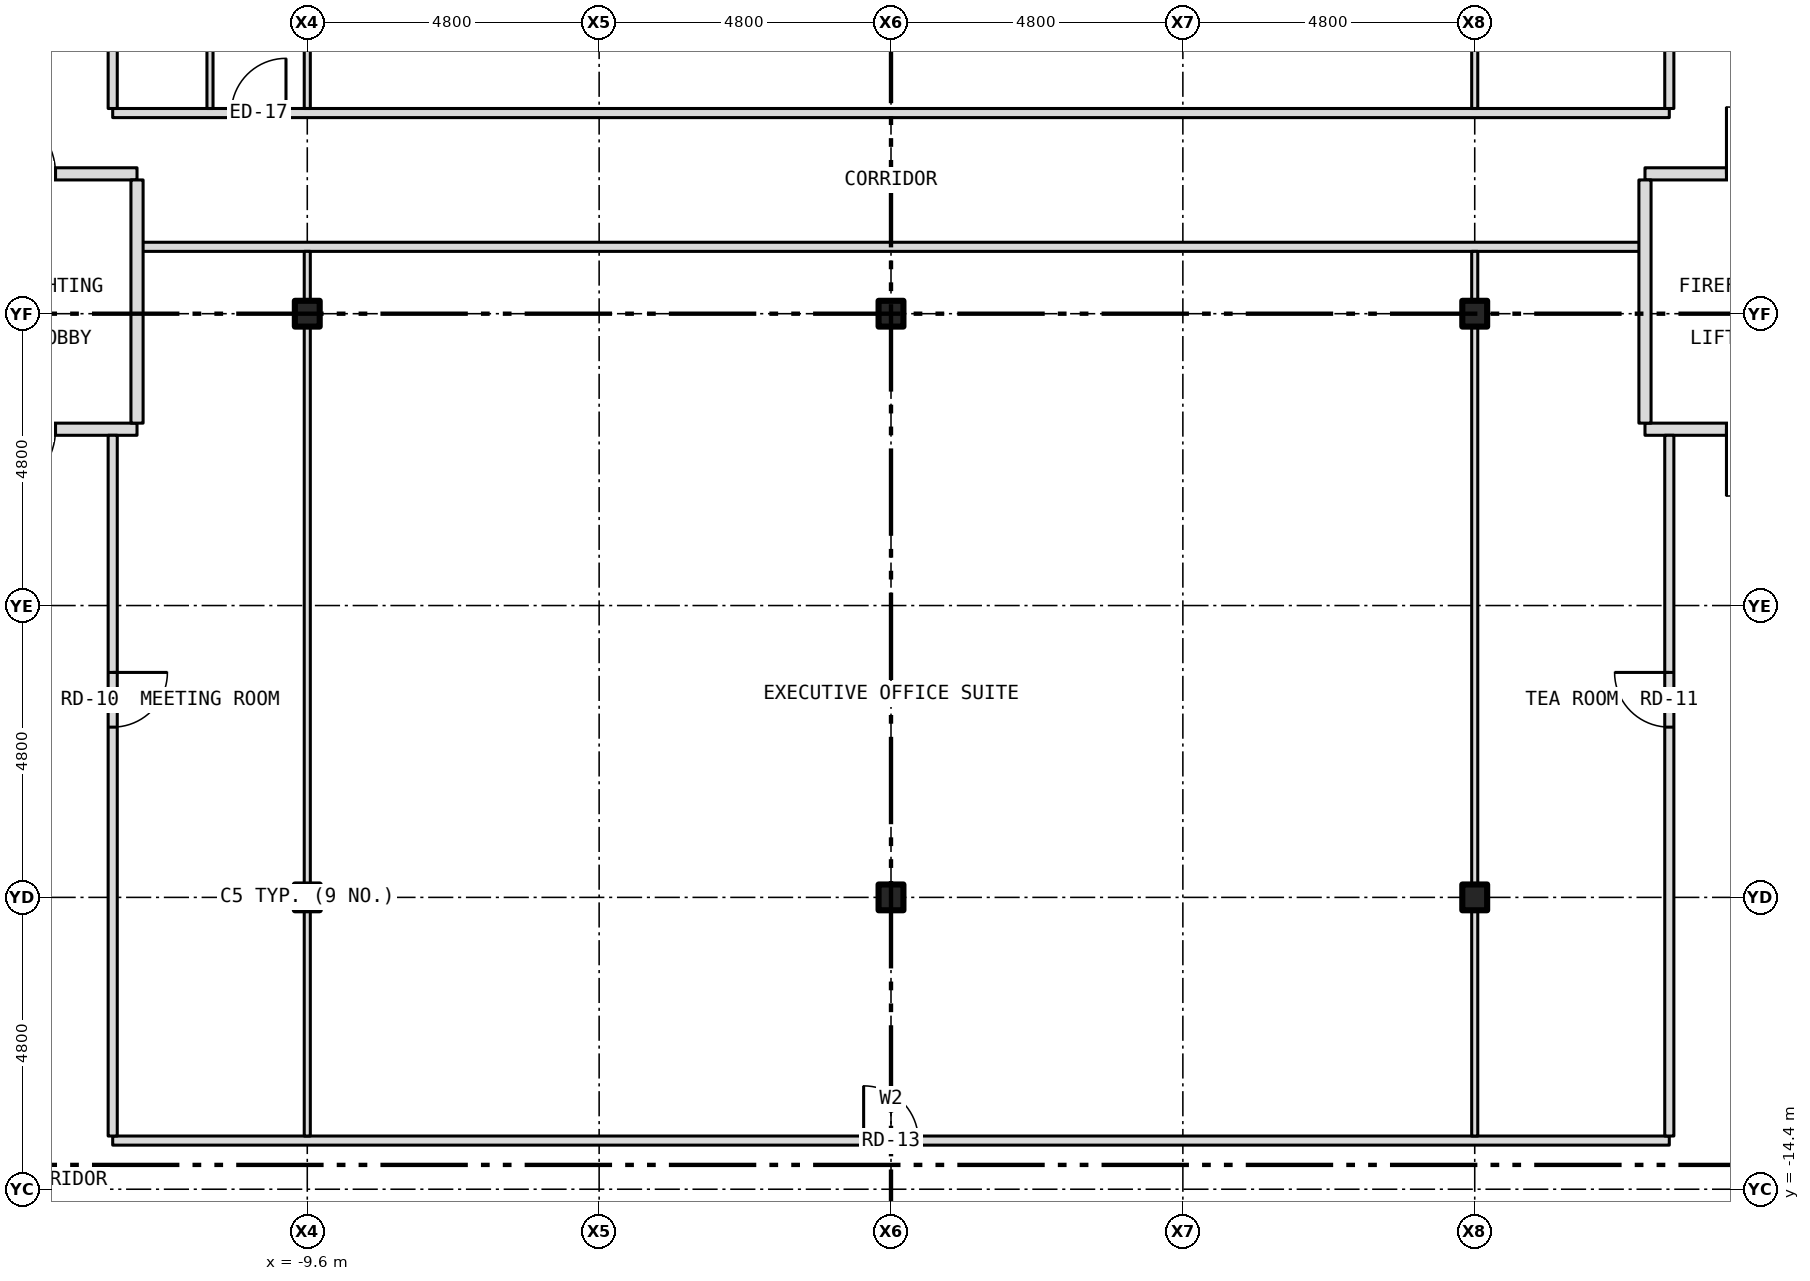
"""IFC4 building model, lengths in metres.
Left out: names, types, materials, properties, quantities, classifications, styles, units other than length and angle.
Written with IfcOpenShell. Run it as: python <this file> out.ifc"""

import sys

from ifc_helpers import new_model, si_unit, direction, frame, frame_2d, origin, origin_2d, place, context, subcontext, project, spatial, rectangle, i_section, extrude, element, fill, save


model = new_model("IFC4")
c1 = context("Model", 3, precision=1e-05, world=origin(), true_north=direction((0.0, 1.0)))
c2 = subcontext(c1, "Body", "Model", "MODEL_VIEW")
j1 = project(units=[si_unit("LENGTHUNIT", "METRE"), si_unit("PLANEANGLEUNIT", "RADIAN")], contexts=[c1])
p1 = place(None, origin())
s1 = spatial("IfcSite", under=j1, at=p1, CompositionType="ELEMENT")
p2 = place(p1, origin())
s2 = spatial("IfcBuilding", under=s1, at=p2, CompositionType="ELEMENT")
p3 = place(p2, frame((0.0, 0.0, 39.0)))
s3 = spatial("IfcBuildingStorey", under=s2, at=p3, CompositionType="ELEMENT", Elevation=39.0)
for number, where, z_axis, x_axis in (
    (1, (-9.6, -9.6, -0.15), (0.0, 0.0, 1.0), (1.0, 0.0, 0.0)),
    (2, (-9.6, 0.0, -0.15), (0.0, 0.0, 1.0), (1.0, 0.0, 0.0)),
    (3, (0.0, -9.6, -0.15), (0.0, 0.0, 1.0), (1.0, 0.0, 0.0)),
    (4, (0.0, 0.0, -0.15), (0.0, 0.0, 1.0), (1.0, 0.0, 0.0)),
    (5, (9.6, -9.6, -0.15), (0.0, 0.0, 1.0), (1.0, 0.0, 0.0)),
    (6, (9.6, 0.0, -0.15), (0.0, 0.0, 1.0), (1.0, 0.0, 0.0)),
):
    element("IfcColumn", number, at=place(p3, frame(where, z_axis=z_axis, x_axis=x_axis)), inside=s3, PredefinedType="COLUMN", context=c2, shape_type="SweptSolid", body=[
        extrude(i_section(OverallWidth=0.409, OverallDepth=0.424, WebThickness=0.033, FlangeThickness=0.052, at=origin_2d()), origin(), (0.0, 0.0, 1.0), 3.5),
    ])
p4 = place(p3, frame((-12.8, -13.6, 0.0), z_axis=(0.0, 0.0, 1.0), x_axis=(1.0, 0.0, 0.0)))
e7 = element("IfcWall", 7, at=p4, inside=s3, PredefinedType="PARTITIONING", context=c2, shape_type="SweptSolid", body=[
    extrude(rectangle(XDim=25.6, YDim=0.15, at=frame_2d((12.8, 0.0))), origin(), (0.0, 0.0, 1.0), 3.35),
])
p5 = place(p4, frame((12.35, 0.0, 0.0)))
e8 = element("IfcOpeningElement", 8, at=p5, cuts=e7, PredefinedType="OPENING", context=c2, shape_type="SweptSolid", body=[
    extrude(rectangle(XDim=0.9, YDim=2.1, at=frame_2d((0.45, 1.05))), frame((0.0, 0.087, 0.0), z_axis=(0.0, -1.0, 0.0), x_axis=(1.0, 0.0, 0.0)), (0.0, 0.0, 1.0), 0.174),
])
p6 = place(p3, frame((-15.68, -1.9, 0.0), z_axis=(0.0, 0.0, 1.0), x_axis=(1.0, 0.0, 0.0)))
e9 = element("IfcWall", 9, at=p6, inside=s3, PredefinedType="PARTITIONING", context=c2, shape_type="SweptSolid", body=[
    extrude(rectangle(XDim=3.28, YDim=0.2, at=frame_2d((1.64, 0.0))), origin(), (0.0, 0.0, 1.0), 3.35),
])
p7 = place(p6, frame((0.84, 0.0, 0.0)))
e10 = element("IfcOpeningElement", 10, at=p7, cuts=e9, PredefinedType="OPENING", context=c2, shape_type="SweptSolid", body=[
    extrude(rectangle(XDim=1.1, YDim=2.1, at=frame_2d((0.55, 1.05))), frame((0.0, 0.112, 0.0), z_axis=(0.0, -1.0, 0.0), x_axis=(1.0, 0.0, 0.0)), (0.0, 0.0, 1.0), 0.224),
])
p8 = place(p3, frame((12.4, -1.9, 0.0), z_axis=(0.0, 0.0, 1.0), x_axis=(1.0, 0.0, 0.0)))
e11 = element("IfcWall", 11, at=p8, inside=s3, PredefinedType="PARTITIONING", context=c2, shape_type="SweptSolid", body=[
    extrude(rectangle(XDim=3.28, YDim=0.2, at=frame_2d((1.64, 0.0))), origin(), (0.0, 0.0, 1.0), 3.35),
])
p9 = place(p8, frame((1.34, 0.0, 0.0)))
e12 = element("IfcOpeningElement", 12, at=p9, cuts=e11, PredefinedType="OPENING", context=c2, shape_type="SweptSolid", body=[
    extrude(rectangle(XDim=1.1, YDim=2.1, at=frame_2d((0.55, 1.05))), frame((0.0, 0.112, 0.0), z_axis=(0.0, -1.0, 0.0), x_axis=(1.0, 0.0, 0.0)), (0.0, 0.0, 1.0), 0.224),
])
p10 = place(p3, frame((-12.4, 1.1, 0.0), z_axis=(0.0, 0.0, 1.0), x_axis=(1.0, 0.0, 0.0)))
e13 = element("IfcWall", 13, at=p10, inside=s3, PredefinedType="PARTITIONING", context=c2, shape_type="SweptSolid", body=[
    extrude(rectangle(XDim=24.8, YDim=0.15, at=frame_2d((12.4, 0.0))), origin(), (0.0, 0.0, 1.0), 3.35),
])
p11 = place(p3, frame((-15.68, 2.3, 0.0), z_axis=(0.0, 0.0, 1.0), x_axis=(1.0, 0.0, 0.0)))
e14 = element("IfcWall", 14, at=p11, inside=s3, PredefinedType="PARTITIONING", context=c2, shape_type="SweptSolid", body=[
    extrude(rectangle(XDim=3.28, YDim=0.2, at=frame_2d((1.64, 0.0))), origin(), (0.0, 0.0, 1.0), 3.35),
])
p12 = place(p11, frame((0.84, 0.0, 0.0)))
e15 = element("IfcOpeningElement", 15, at=p12, cuts=e14, PredefinedType="OPENING", context=c2, shape_type="SweptSolid", body=[
    extrude(rectangle(XDim=1.1, YDim=2.1, at=frame_2d((0.55, 1.05))), frame((0.0, 0.112, 0.0), z_axis=(0.0, -1.0, 0.0), x_axis=(1.0, 0.0, 0.0)), (0.0, 0.0, 1.0), 0.224),
])
p13 = place(p3, frame((12.4, 2.3, 0.0), z_axis=(0.0, 0.0, 1.0), x_axis=(1.0, 0.0, 0.0)))
e16 = element("IfcWall", 16, at=p13, inside=s3, PredefinedType="PARTITIONING", context=c2, shape_type="SweptSolid", body=[
    extrude(rectangle(XDim=3.28, YDim=0.2, at=frame_2d((1.64, 0.0))), origin(), (0.0, 0.0, 1.0), 3.35),
])
p14 = place(p13, frame((1.34, 0.0, 0.0)))
e17 = element("IfcOpeningElement", 17, at=p14, cuts=e16, PredefinedType="OPENING", context=c2, shape_type="SweptSolid", body=[
    extrude(rectangle(XDim=1.1, YDim=2.1, at=frame_2d((0.55, 1.05))), frame((0.0, 0.112, 0.0), z_axis=(0.0, -1.0, 0.0), x_axis=(1.0, 0.0, 0.0)), (0.0, 0.0, 1.0), 0.224),
])
p15 = place(p3, frame((-12.8, 3.3, 0.0), z_axis=(0.0, 0.0, 1.0), x_axis=(1.0, 0.0, 0.0)))
e18 = element("IfcWall", 18, at=p15, inside=s3, PredefinedType="PARTITIONING", context=c2, shape_type="SweptSolid", body=[
    extrude(rectangle(XDim=25.6, YDim=0.15, at=frame_2d((12.8, 0.0))), origin(), (0.0, 0.0, 1.0), 3.35),
])
p16 = place(p15, frame((1.95, 0.0, 0.0)))
e19 = element("IfcOpeningElement", 19, at=p16, cuts=e18, PredefinedType="OPENING", context=c2, shape_type="SweptSolid", body=[
    extrude(rectangle(XDim=0.9, YDim=2.1, at=frame_2d((0.45, 1.05))), frame((0.0, 0.087, 0.0), z_axis=(0.0, -1.0, 0.0), x_axis=(1.0, 0.0, 0.0)), (0.0, 0.0, 1.0), 0.174),
])
p17 = place(p3, frame((-12.8, -13.525, 0.0), z_axis=(0.0, 0.0, 1.0), x_axis=(0.0, 1.0, 0.0)))
e20 = element("IfcWall", 20, at=p17, inside=s3, PredefinedType="PARTITIONING", context=c2, shape_type="SweptSolid", body=[
    extrude(rectangle(XDim=11.525, YDim=0.15, at=frame_2d((5.762, 0.0))), origin(), (0.0, 0.0, 1.0), 3.35),
])
p18 = place(p17, frame((6.725, 0.0, 0.0)))
e21 = element("IfcOpeningElement", 21, at=p18, cuts=e20, PredefinedType="OPENING", context=c2, shape_type="SweptSolid", body=[
    extrude(rectangle(XDim=0.9, YDim=2.1, at=frame_2d((0.45, 1.05))), frame((0.0, 0.087, 0.0), z_axis=(0.0, -1.0, 0.0), x_axis=(1.0, 0.0, 0.0)), (0.0, 0.0, 1.0), 0.174),
])
p19 = place(p3, frame((-12.8, 3.375, 0.0), z_axis=(0.0, 0.0, 1.0), x_axis=(0.0, 1.0, 0.0)))
e22 = element("IfcWall", 22, at=p19, inside=s3, PredefinedType="PARTITIONING", context=c2, shape_type="SweptSolid", body=[
    extrude(rectangle(XDim=7.275, YDim=0.15, at=frame_2d((3.637, 0.0))), origin(), (0.0, 0.0, 1.0), 3.35),
])
p20 = place(p19, frame((3.175, 0.0, 0.0)))
e23 = element("IfcOpeningElement", 23, at=p20, cuts=e22, PredefinedType="OPENING", context=c2, shape_type="SweptSolid", body=[
    extrude(rectangle(XDim=0.9, YDim=2.1, at=frame_2d((0.45, 1.05))), frame((0.0, 0.087, 0.0), z_axis=(0.0, -1.0, 0.0), x_axis=(1.0, 0.0, 0.0)), (0.0, 0.0, 1.0), 0.174),
])
p21 = place(p3, frame((-12.4, -1.8, 0.0), z_axis=(0.0, 0.0, 1.0), x_axis=(0.0, 1.0, 0.0)))
e24 = element("IfcWall", 24, at=p21, inside=s3, PredefinedType="PARTITIONING", context=c2, shape_type="SweptSolid", body=[
    extrude(rectangle(XDim=4.0, YDim=0.2, at=frame_2d((2.0, 0.0))), origin(), (0.0, 0.0, 1.0), 3.35),
])
p22 = place(p3, frame((-11.2, 3.375, 0.0), z_axis=(0.0, 0.0, 1.0), x_axis=(0.0, 1.0, 0.0)))
e25 = element("IfcWall", 25, at=p22, inside=s3, PredefinedType="PARTITIONING", context=c2, shape_type="SweptSolid", body=[
    extrude(rectangle(XDim=10.15, YDim=0.1, at=frame_2d((5.075, 0.0))), origin(), (0.0, 0.0, 1.0), 3.35),
])
p23 = place(p3, frame((-9.6, -13.525, 0.0), z_axis=(0.0, 0.0, 1.0), x_axis=(0.0, 1.0, 0.0)))
e26 = element("IfcWall", 26, at=p23, inside=s3, PredefinedType="PARTITIONING", context=c2, shape_type="SweptSolid", body=[
    extrude(rectangle(XDim=3.721, YDim=0.1, at=frame_2d((1.86, 0.0))), origin(), (0.0, 0.0, 1.0), 2.728),
])
p24 = place(p3, frame((-9.6, -9.804, 0.0), z_axis=(0.0, 0.0, 1.0), x_axis=(0.0, 1.0, 0.0)))
e27 = element("IfcWall", 27, at=p24, inside=s3, PredefinedType="PARTITIONING", context=c2, shape_type="SweptSolid", body=[
    extrude(rectangle(XDim=0.408, YDim=0.1, at=frame_2d((0.204, 0.0))), origin(), (0.0, 0.0, 1.0), 3.35),
])
p25 = place(p3, frame((-9.6, -9.396, 0.0), z_axis=(0.0, 0.0, 1.0), x_axis=(0.0, 1.0, 0.0)))
e28 = element("IfcWall", 28, at=p25, inside=s3, PredefinedType="PARTITIONING", context=c2, shape_type="SweptSolid", body=[
    extrude(rectangle(XDim=9.192, YDim=0.1, at=frame_2d((4.596, 0.0))), origin(), (0.0, 0.0, 1.0), 2.728),
])
p26 = place(p3, frame((-9.6, -0.204, 0.0), z_axis=(0.0, 0.0, 1.0), x_axis=(0.0, 1.0, 0.0)))
e29 = element("IfcWall", 29, at=p26, inside=s3, PredefinedType="PARTITIONING", context=c2, shape_type="SweptSolid", body=[
    extrude(rectangle(XDim=0.408, YDim=0.1, at=frame_2d((0.204, 0.0))), origin(), (0.0, 0.0, 1.0), 3.35),
])
p27 = place(p3, frame((-9.6, 0.204, 0.0), z_axis=(0.0, 0.0, 1.0), x_axis=(0.0, 1.0, 0.0)))
e30 = element("IfcWall", 30, at=p27, inside=s3, PredefinedType="PARTITIONING", context=c2, shape_type="SweptSolid", body=[
    extrude(rectangle(XDim=0.821, YDim=0.1, at=frame_2d((0.41, 0.0))), origin(), (0.0, 0.0, 1.0), 2.728),
])
p28 = place(p3, frame((-9.6, 3.375, 0.0), z_axis=(0.0, 0.0, 1.0), x_axis=(0.0, 1.0, 0.0)))
e31 = element("IfcWall", 31, at=p28, inside=s3, PredefinedType="PARTITIONING", context=c2, shape_type="SweptSolid", body=[
    extrude(rectangle(XDim=6.021, YDim=0.1, at=frame_2d((3.01, 0.0))), origin(), (0.0, 0.0, 1.0), 2.728),
])
p29 = place(p3, frame((9.6, -13.525, 0.0), z_axis=(0.0, 0.0, 1.0), x_axis=(0.0, 1.0, 0.0)))
e32 = element("IfcWall", 32, at=p29, inside=s3, PredefinedType="PARTITIONING", context=c2, shape_type="SweptSolid", body=[
    extrude(rectangle(XDim=3.721, YDim=0.1, at=frame_2d((1.86, 0.0))), origin(), (0.0, 0.0, 1.0), 2.728),
])
p30 = place(p3, frame((9.6, -9.804, 0.0), z_axis=(0.0, 0.0, 1.0), x_axis=(0.0, 1.0, 0.0)))
e33 = element("IfcWall", 33, at=p30, inside=s3, PredefinedType="PARTITIONING", context=c2, shape_type="SweptSolid", body=[
    extrude(rectangle(XDim=0.408, YDim=0.1, at=frame_2d((0.204, 0.0))), origin(), (0.0, 0.0, 1.0), 3.35),
])
p31 = place(p3, frame((9.6, -9.396, 0.0), z_axis=(0.0, 0.0, 1.0), x_axis=(0.0, 1.0, 0.0)))
e34 = element("IfcWall", 34, at=p31, inside=s3, PredefinedType="PARTITIONING", context=c2, shape_type="SweptSolid", body=[
    extrude(rectangle(XDim=9.192, YDim=0.1, at=frame_2d((4.596, 0.0))), origin(), (0.0, 0.0, 1.0), 2.728),
])
p32 = place(p3, frame((9.6, -0.204, 0.0), z_axis=(0.0, 0.0, 1.0), x_axis=(0.0, 1.0, 0.0)))
e35 = element("IfcWall", 35, at=p32, inside=s3, PredefinedType="PARTITIONING", context=c2, shape_type="SweptSolid", body=[
    extrude(rectangle(XDim=0.408, YDim=0.1, at=frame_2d((0.204, 0.0))), origin(), (0.0, 0.0, 1.0), 3.35),
])
p33 = place(p3, frame((9.6, 0.204, 0.0), z_axis=(0.0, 0.0, 1.0), x_axis=(0.0, 1.0, 0.0)))
e36 = element("IfcWall", 36, at=p33, inside=s3, PredefinedType="PARTITIONING", context=c2, shape_type="SweptSolid", body=[
    extrude(rectangle(XDim=0.821, YDim=0.1, at=frame_2d((0.41, 0.0))), origin(), (0.0, 0.0, 1.0), 2.728),
])
p34 = place(p3, frame((9.6, 3.375, 0.0), z_axis=(0.0, 0.0, 1.0), x_axis=(0.0, 1.0, 0.0)))
e37 = element("IfcWall", 37, at=p34, inside=s3, PredefinedType="PARTITIONING", context=c2, shape_type="SweptSolid", body=[
    extrude(rectangle(XDim=6.021, YDim=0.1, at=frame_2d((3.01, 0.0))), origin(), (0.0, 0.0, 1.0), 2.728),
])
p35 = place(p3, frame((12.4, -1.8, 0.0), z_axis=(0.0, 0.0, 1.0), x_axis=(0.0, 1.0, 0.0)))
e38 = element("IfcWall", 38, at=p35, inside=s3, PredefinedType="PARTITIONING", context=c2, shape_type="SweptSolid", body=[
    extrude(rectangle(XDim=4.0, YDim=0.2, at=frame_2d((2.0, 0.0))), origin(), (0.0, 0.0, 1.0), 3.35),
])
p36 = place(p3, frame((12.8, -13.525, 0.0), z_axis=(0.0, 0.0, 1.0), x_axis=(0.0, 1.0, 0.0)))
e39 = element("IfcWall", 39, at=p36, inside=s3, PredefinedType="PARTITIONING", context=c2, shape_type="SweptSolid", body=[
    extrude(rectangle(XDim=11.525, YDim=0.15, at=frame_2d((5.762, 0.0))), origin(), (0.0, 0.0, 1.0), 3.35),
])
p37 = place(p36, frame((6.725, 0.0, 0.0)))
e40 = element("IfcOpeningElement", 40, at=p37, cuts=e39, PredefinedType="OPENING", context=c2, shape_type="SweptSolid", body=[
    extrude(rectangle(XDim=0.9, YDim=2.1, at=frame_2d((0.45, 1.05))), frame((0.0, 0.087, 0.0), z_axis=(0.0, -1.0, 0.0), x_axis=(1.0, 0.0, 0.0)), (0.0, 0.0, 1.0), 0.174),
])
p38 = place(p3, frame((12.8, 3.375, 0.0), z_axis=(0.0, 0.0, 1.0), x_axis=(0.0, 1.0, 0.0)))
e41 = element("IfcWall", 41, at=p38, inside=s3, PredefinedType="PARTITIONING", context=c2, shape_type="SweptSolid", body=[
    extrude(rectangle(XDim=7.275, YDim=0.15, at=frame_2d((3.637, 0.0))), origin(), (0.0, 0.0, 1.0), 3.35),
])
p39 = place(p38, frame((3.175, 0.0, 0.0)))
e42 = element("IfcOpeningElement", 42, at=p39, cuts=e41, PredefinedType="OPENING", context=c2, shape_type="SweptSolid", body=[
    extrude(rectangle(XDim=0.9, YDim=2.1, at=frame_2d((0.45, 1.05))), frame((0.0, 0.087, 0.0), z_axis=(0.0, -1.0, 0.0), x_axis=(1.0, 0.0, 0.0)), (0.0, 0.0, 1.0), 0.174),
])
p40 = place(p12, origin())
e43 = element("IfcDoor", 43, at=p40, inside=s3, OperationType="SINGLE_SWING_LEFT", PredefinedType="DOOR", context=c2, shape_type="SweptSolid", body=[
    extrude(rectangle(XDim=1.1, YDim=2.1, at=frame_2d((0.55, 1.05))), frame((0.0, 0.025, 0.0), z_axis=(0.0, -1.0, 0.0), x_axis=(1.0, 0.0, 0.0)), (0.0, 0.0, 1.0), 0.05),
])
fill(e15, e43)
p41 = place(p7, origin())
e44 = element("IfcDoor", 44, at=p41, inside=s3, OperationType="SINGLE_SWING_LEFT", PredefinedType="DOOR", context=c2, shape_type="SweptSolid", body=[
    extrude(rectangle(XDim=1.1, YDim=2.1, at=frame_2d((0.55, 1.05))), frame((0.0, 0.025, 0.0), z_axis=(0.0, -1.0, 0.0), x_axis=(1.0, 0.0, 0.0)), (0.0, 0.0, 1.0), 0.05),
])
fill(e10, e44)
p42 = place(p14, origin())
e45 = element("IfcDoor", 45, at=p42, inside=s3, OperationType="SINGLE_SWING_LEFT", PredefinedType="DOOR", context=c2, shape_type="SweptSolid", body=[
    extrude(rectangle(XDim=1.1, YDim=2.1, at=frame_2d((0.55, 1.05))), frame((0.0, 0.025, 0.0), z_axis=(0.0, -1.0, 0.0), x_axis=(1.0, 0.0, 0.0)), (0.0, 0.0, 1.0), 0.05),
])
fill(e17, e45)
p43 = place(p9, origin())
e46 = element("IfcDoor", 46, at=p43, inside=s3, OperationType="SINGLE_SWING_LEFT", PredefinedType="DOOR", context=c2, shape_type="SweptSolid", body=[
    extrude(rectangle(XDim=1.1, YDim=2.1, at=frame_2d((0.55, 1.05))), frame((0.0, 0.025, 0.0), z_axis=(0.0, -1.0, 0.0), x_axis=(1.0, 0.0, 0.0)), (0.0, 0.0, 1.0), 0.05),
])
fill(e12, e46)
p44 = place(p16, origin())
e47 = element("IfcDoor", 47, at=p44, inside=s3, OperationType="SINGLE_SWING_RIGHT", PredefinedType="DOOR", context=c2, shape_type="SweptSolid", body=[
    extrude(rectangle(XDim=0.9, YDim=2.1, at=frame_2d((0.45, 1.05))), frame((0.0, 0.025, 0.0), z_axis=(0.0, -1.0, 0.0), x_axis=(1.0, 0.0, 0.0)), (0.0, 0.0, 1.0), 0.05),
])
fill(e19, e47)
p45 = place(p18, origin())
e48 = element("IfcDoor", 48, at=p45, inside=s3, OperationType="SINGLE_SWING_RIGHT", PredefinedType="DOOR", context=c2, shape_type="SweptSolid", body=[
    extrude(rectangle(XDim=0.9, YDim=2.1, at=frame_2d((0.45, 1.05))), frame((0.0, 0.025, 0.0), z_axis=(0.0, -1.0, 0.0), x_axis=(1.0, 0.0, 0.0)), (0.0, 0.0, 1.0), 0.05),
])
fill(e21, e48)
p46 = place(p37, origin())
e49 = element("IfcDoor", 49, at=p46, inside=s3, OperationType="SINGLE_SWING_RIGHT", PredefinedType="DOOR", context=c2, shape_type="SweptSolid", body=[
    extrude(rectangle(XDim=0.9, YDim=2.1, at=frame_2d((0.45, 1.05))), frame((0.0, 0.025, 0.0), z_axis=(0.0, -1.0, 0.0), x_axis=(1.0, 0.0, 0.0)), (0.0, 0.0, 1.0), 0.05),
])
fill(e40, e49)
p47 = place(p5, origin())
e50 = element("IfcDoor", 50, at=p47, inside=s3, OperationType="SINGLE_SWING_LEFT", PredefinedType="DOOR", context=c2, shape_type="SweptSolid", body=[
    extrude(rectangle(XDim=0.9, YDim=2.1, at=frame_2d((0.45, 1.05))), frame((0.0, 0.025, 0.0), z_axis=(0.0, -1.0, 0.0), x_axis=(1.0, 0.0, 0.0)), (0.0, 0.0, 1.0), 0.05),
])
fill(e8, e50)
save(model, sys.argv[1])
